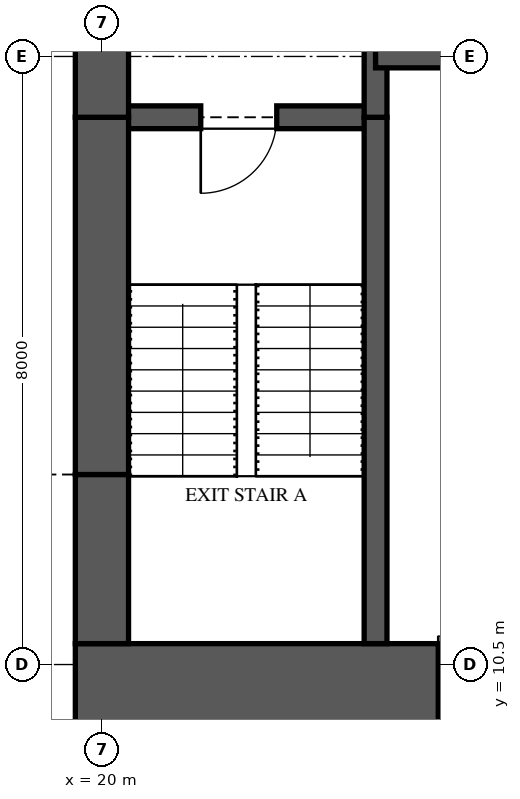
"""IFC4 building model, lengths in metres.
Left out: names, types, materials, properties, quantities, classifications, styles, units other than length and angle.
Written with IfcOpenShell. Run it as: python <this file> out.ifc"""

import sys

from ifc_helpers import new_model, si_unit, direction, frame, frame_2d, origin, place, context, subcontext, project, spatial, rectangle, extrude, element, fill, save


model = new_model("IFC4")
c1 = context("Model", 3, precision=1e-05, world=origin(), true_north=direction((0.0, 1.0)))
c2 = subcontext(c1, "Body", "Model", "MODEL_VIEW")
j1 = project(units=[si_unit("LENGTHUNIT", "METRE"), si_unit("PLANEANGLEUNIT", "RADIAN")], contexts=[c1])
p1 = place(None, origin())
s1 = spatial("IfcSite", under=j1, at=p1, CompositionType="ELEMENT")
p2 = place(p1, origin())
s2 = spatial("IfcBuilding", under=s1, at=p2, CompositionType="ELEMENT")
p3 = place(p2, frame((0.0, 0.0, 177.8)))
s3 = spatial("IfcBuildingStorey", under=s2, at=p3, CompositionType="ELEMENT", Elevation=177.8)
p4 = place(p3, frame((19.65, 10.125, 0.0), z_axis=(0.0, 0.0, 1.0), x_axis=(1.0, 0.0, 0.0)))
e1 = element("IfcWall", 1, at=p4, inside=s3, PredefinedType="SHEAR", context=c2, shape_type="SweptSolid", body=[
    extrude(rectangle(XDim=6.35, YDim=1.3, at=frame_2d((3.175, 0.0))), origin(), (0.0, 0.0, 1.0), 3.35),
])
p5 = place(p4, frame((4.775, 0.0, 0.0)))
e2 = element("IfcOpeningElement", 2, at=p5, cuts=e1, PredefinedType="OPENING", context=c2, shape_type="SweptSolid", body=[
    extrude(rectangle(XDim=0.75, YDim=2.1, at=frame_2d((0.375, 1.05))), frame((0.0, 0.66, 0.0), z_axis=(0.0, -1.0, 0.0), x_axis=(1.0, 0.0, 0.0)), (0.0, 0.0, 1.0), 1.32),
])
p6 = place(p3, frame((20.0, 23.3, 0.0), z_axis=(0.0, 0.0, 1.0), x_axis=(0.0, -1.0, 0.0)))
e3 = element("IfcWall", 3, at=p6, inside=s3, PredefinedType="SHEAR", context=c2, shape_type="SweptSolid", body=[
    extrude(rectangle(XDim=5.6, YDim=0.7, at=frame_2d((2.8, 0.0))), origin(), (0.0, 0.0, 1.0), 3.35),
])
p7 = place(p6, frame((3.4, 0.0, 0.0)))
e4 = element("IfcOpeningElement", 4, at=p7, cuts=e3, PredefinedType="OPENING", context=c2, shape_type="SweptSolid", body=[
    extrude(rectangle(XDim=1.2, YDim=2.2, at=frame_2d((0.6, 1.1))), frame((0.0, 0.36, 0.0), z_axis=(0.0, -1.0, 0.0), x_axis=(1.0, 0.0, 0.0)), (0.0, 0.0, 1.0), 0.72),
])
p8 = place(p3, frame((20.0, 17.7, 0.0), z_axis=(0.0, 0.0, 1.0), x_axis=(0.0, -1.0, 0.0)))
e5 = element("IfcWall", 5, at=p8, inside=s3, PredefinedType="SHEAR", context=c2, shape_type="SweptSolid", body=[
    extrude(rectangle(XDim=4.7, YDim=0.7, at=frame_2d((2.35, 0.0))), origin(), (0.0, 0.0, 1.0), 3.35),
])
p9 = place(p3, frame((20.0, 13.0, 0.0), z_axis=(0.0, 0.0, 1.0), x_axis=(0.0, -1.0, 0.0)))
e6 = element("IfcWall", 6, at=p9, inside=s3, PredefinedType="SHEAR", context=c2, shape_type="SweptSolid", body=[
    extrude(rectangle(XDim=2.225, YDim=0.7, at=frame_2d((1.113, 0.0))), origin(), (0.0, 0.0, 1.0), 3.35),
])
p10 = place(p3, frame((23.6, 10.775, 0.0), z_axis=(0.0, 0.0, 1.0), x_axis=(0.0, 1.0, 0.0)))
e7 = element("IfcWall", 7, at=p10, inside=s3, PredefinedType="SHEAR", context=c2, shape_type="SweptSolid", body=[
    extrude(rectangle(XDim=6.925, YDim=0.3, at=frame_2d((3.462, 0.0))), origin(), (0.0, 0.0, 1.0), 3.35),
])
p11 = place(p3, frame((23.6, 17.7, 0.0), z_axis=(0.0, 0.0, 1.0), x_axis=(0.0, 1.0, 0.0)))
e8 = element("IfcWall", 8, at=p11, inside=s3, PredefinedType="SHEAR", context=c2, shape_type="SweptSolid", body=[
    extrude(rectangle(XDim=5.6, YDim=0.3, at=frame_2d((2.8, 0.0))), origin(), (0.0, 0.0, 1.0), 3.35),
])
p12 = place(p3, frame((20.0, 17.7, 0.0), z_axis=(0.0, 0.0, 1.0), x_axis=(1.0, 0.0, 0.0)))
e9 = element("IfcWall", 9, at=p12, inside=s3, PredefinedType="SHEAR", context=c2, shape_type="SweptSolid", body=[
    extrude(rectangle(XDim=3.6, YDim=0.3, at=frame_2d((1.8, 0.0))), origin(), (0.0, 0.0, 1.0), 3.35),
])
p13 = place(p12, frame((1.3, 0.0, 0.0)))
e10 = element("IfcOpeningElement", 10, at=p13, cuts=e9, PredefinedType="OPENING", context=c2, shape_type="SweptSolid", body=[
    extrude(rectangle(XDim=1.0, YDim=2.1, at=frame_2d((0.5, 1.05))), frame((0.0, 0.16, 0.0), z_axis=(0.0, -1.0, 0.0), x_axis=(1.0, 0.0, 0.0)), (0.0, 0.0, 1.0), 0.32),
])
p14 = place(p3, frame((23.6, 18.5, 0.0), z_axis=(0.0, 0.0, 1.0), x_axis=(1.0, 0.0, 0.0)))
e11 = element("IfcWall", 11, at=p14, inside=s3, PredefinedType="SHEAR", context=c2, shape_type="SweptSolid", body=[
    extrude(rectangle(XDim=2.4, YDim=0.3, at=frame_2d((1.2, 0.0))), origin(), (0.0, 0.0, 1.0), 3.35),
])
p15 = place(p13, frame((1.0, 0.0, 0.0), z_axis=(0.0, 0.0, 1.0), x_axis=(-1.0, 0.0, 0.0)))
e12 = element("IfcDoor", 12, at=p15, inside=s3, OperationType="SINGLE_SWING_RIGHT", PredefinedType="DOOR", context=c2, shape_type="SweptSolid", body=[
    extrude(rectangle(XDim=1.0, YDim=2.1, at=frame_2d((0.5, 1.05))), frame((0.0, 0.025, 0.0), z_axis=(0.0, -1.0, 0.0), x_axis=(1.0, 0.0, 0.0)), (0.0, 0.0, 1.0), 0.05),
])
fill(e10, e12)
p16 = place(p5, origin())
e13 = element("IfcDoor", 13, at=p16, inside=s3, OperationType="SINGLE_SWING_LEFT", PredefinedType="DOOR", context=c2, shape_type="SweptSolid", body=[
    extrude(rectangle(XDim=0.75, YDim=2.1, at=frame_2d((0.375, 1.05))), frame((0.0, 0.025, 0.0), z_axis=(0.0, -1.0, 0.0), x_axis=(1.0, 0.0, 0.0)), (0.0, 0.0, 1.0), 0.05),
])
fill(e2, e13)
save(model, sys.argv[1])
